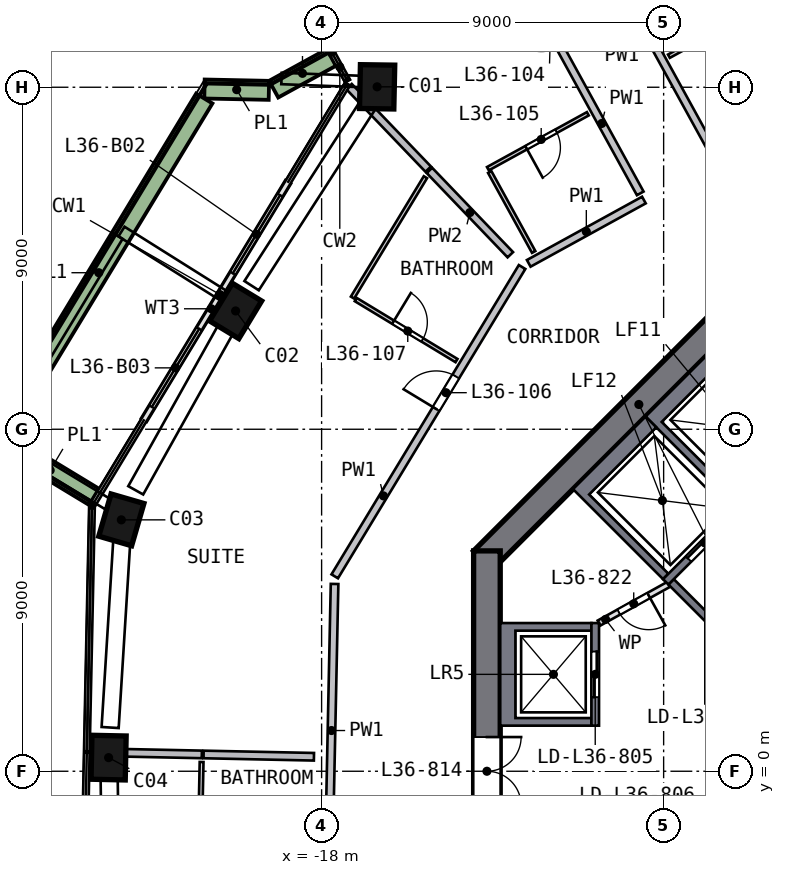
"""IFC4 building model, lengths in metres.
Left out: names, types, materials, properties, quantities, classifications, styles, units other than length and angle.
Written with IfcOpenShell. Run it as: python <this file> out.ifc"""

import sys

from ifc_helpers import new_model, si_unit, direction, frame, frame_2d, origin, origin_2d, place, context, subcontext, project, spatial, polyline, rectangle, outline, extrude, element, fill, save


model = new_model("IFC4")
c1 = context("Model", 3, precision=1e-05, world=origin(), true_north=direction((0.0, 1.0)))
c2 = subcontext(c1, "Body", "Model", "MODEL_VIEW")
j1 = project(units=[si_unit("LENGTHUNIT", "METRE"), si_unit("PLANEANGLEUNIT", "RADIAN")], contexts=[c1])
p1 = place(None, origin())
s1 = spatial("IfcSite", under=j1, at=p1, CompositionType="ELEMENT")
p2 = place(p1, origin())
s2 = spatial("IfcBuilding", under=s1, at=p2, CompositionType="ELEMENT")
p3 = place(p2, frame((0.0, 0.0, 150.5)))
s3 = spatial("IfcBuildingStorey", under=s2, at=p3, CompositionType="ELEMENT", Elevation=150.5)
p4 = place(p3, frame((-16.436, 18.106, 0.0), z_axis=(-0.085441544, -0.078828186, 0.993219945), x_axis=(0.014387845, 0.996663735, 0.080339219)))
e1 = element("IfcColumn", 1, at=p4, inside=s3, PredefinedType="COLUMN", context=c2, shape_type="SweptSolid", body=[
    extrude(rectangle(XDim=1.15, YDim=0.9, at=origin_2d()), origin(), (0.0, 0.0, 1.0), 3.212),
])
p5 = place(p3, frame((-20.194, 12.23, 0.0), z_axis=(-0.057418061, -0.096507973, 0.993674684), x_axis=(-0.515299129, -0.849621729, -0.112293037)))
e2 = element("IfcColumn", 2, at=p5, inside=s3, PredefinedType="COLUMN", context=c2, shape_type="SweptSolid", body=[
    extrude(rectangle(XDim=1.15, YDim=0.9, at=origin_2d()), origin(), (0.0, 0.0, 1.0), 3.21),
])
p6 = place(p3, frame((-23.232, 6.75, 0.0), z_axis=(-0.031170704, -0.11077004, 0.993357129), x_axis=(0.277188554, 0.953900326, 0.115068122)))
e3 = element("IfcColumn", 3, at=p6, inside=s3, PredefinedType="COLUMN", context=c2, shape_type="SweptSolid", body=[
    extrude(rectangle(XDim=1.15, YDim=0.9, at=origin_2d()), origin(), (0.0, 0.0, 1.0), 3.211),
])
p7 = place(p3, frame((-23.603, 0.494, 0.0), z_axis=(-0.001368902, -0.112325982, 0.993670468), x_axis=(-0.020539358, -0.993458621, -0.11233033)))
e4 = element("IfcColumn", 4, at=p7, inside=s3, PredefinedType="COLUMN", context=c2, shape_type="SweptSolid", body=[
    extrude(rectangle(XDim=1.15, YDim=0.9, at=origin_2d()), origin(), (0.0, 0.0, 1.0), 3.21),
])
p8 = place(p3, frame((-5.552, 13.752, 0.0), z_axis=(0.0, 0.0, 1.0), x_axis=(-0.707106781, -0.707106781, 0.0)))
e5 = element("IfcWall", 5, at=p8, inside=s3, PredefinedType="SHEAR", context=c2, shape_type="SweptSolid", body=[
    extrude(rectangle(XDim=11.598, YDim=0.7, at=frame_2d((5.799, 0.0))), origin(), (0.0, 0.0, 1.0), 3.5),
])
p9 = place(p3, frame((-13.65, 5.799, 0.0), z_axis=(0.0, 0.0, 1.0), x_axis=(0.0, -1.0, 0.0)))
e6 = element("IfcWall", 6, at=p9, inside=s3, PredefinedType="SHEAR", context=c2, shape_type="SweptSolid", body=[
    extrude(rectangle(XDim=11.598, YDim=0.7, at=frame_2d((5.799, 0.0))), origin(), (0.0, 0.0, 1.0), 3.5),
])
p10 = place(p9, frame((4.899, 0.0, 0.0)))
e7 = element("IfcOpeningElement", 7, at=p10, cuts=e6, PredefinedType="OPENING", context=c2, shape_type="SweptSolid", body=[
    extrude(rectangle(XDim=1.8, YDim=2.1, at=frame_2d((0.9, 1.05))), frame((0.0, 0.36, 0.0), z_axis=(0.0, -1.0, 0.0), x_axis=(1.0, 0.0, 0.0)), (0.0, 0.0, 1.0), 0.72),
])
p11 = place(p3, frame((-16.185, 19.84, 0.0), z_axis=(0.0, 0.0, 1.0), x_axis=(-0.876353337, -0.481668796, 0.0)))
e8 = element("IfcWall", 8, at=p11, inside=s3, PredefinedType="SOLIDWALL", context=c2, shape_type="SweptSolid", body=[
    extrude(rectangle(XDim=1.875, YDim=0.15, at=frame_2d((0.938, 0.0))), origin(), (0.0, 0.0, 1.0), 3.19),
])
p12 = place(p3, frame((-18.885, 15.5, 0.0), z_axis=(0.0, 0.0, 1.0), x_axis=(-0.518004284, -0.855378023, 0.0)))
e9 = element("IfcWall", 9, at=p12, inside=s3, PredefinedType="SOLIDWALL", context=c2, shape_type="SweptSolid", body=[
    extrude(rectangle(XDim=3.475, YDim=0.15, at=frame_2d((1.737, 0.0))), origin(), (0.0, 0.0, 1.0), 2.475),
])
p13 = place(p12, frame((0.4, 0.0, 0.0)))
e10 = element("IfcOpeningElement", 10, at=p13, cuts=e9, PredefinedType="OPENING", context=c2, shape_type="SweptSolid", body=[
    extrude(rectangle(XDim=2.4, YDim=2.4, at=frame_2d((1.2, 1.2))), frame((0.0, 0.085, 0.0), z_axis=(0.0, -1.0, 0.0), x_axis=(1.0, 0.0, 0.0)), (0.0, 0.0, 1.0), 0.17),
])
p14 = place(p3, frame((-20.686, 12.528, 0.0), z_axis=(0.0, 0.0, 1.0), x_axis=(-0.518011078, -0.855373908, 0.0)))
e11 = element("IfcWall", 11, at=p14, inside=s3, PredefinedType="SOLIDWALL", context=c2, shape_type="SweptSolid", body=[
    extrude(rectangle(XDim=3.835, YDim=0.15, at=frame_2d((1.918, 0.0))), origin(), (0.0, 0.0, 1.0), 2.475),
])
p15 = place(p14, frame((1.035, 0.0, 0.0)))
e12 = element("IfcOpeningElement", 12, at=p15, cuts=e11, PredefinedType="OPENING", context=c2, shape_type="SweptSolid", body=[
    extrude(rectangle(XDim=2.4, YDim=2.4, at=frame_2d((1.2, 1.2))), frame((0.0, 0.085, 0.0), z_axis=(0.0, -1.0, 0.0), x_axis=(1.0, 0.0, 0.0)), (0.0, 0.0, 1.0), 0.17),
])
p16 = place(p3, frame((-17.745, 18.783, 0.0), z_axis=(0.0, 0.0, 1.0), x_axis=(-0.876317123, -0.481734678, 0.0)))
e13 = element("IfcWall", 13, at=p16, inside=s3, PredefinedType="SOLIDWALL", context=c2, shape_type="SweptSolid", body=[
    extrude(rectangle(XDim=1.731, YDim=0.5, at=frame_2d((0.866, 0.0))), origin(), (0.0, 0.0, 1.0), 0.7),
])
p17 = place(p3, frame((-19.387, 17.918, 0.0), z_axis=(0.0, 0.0, 1.0), x_axis=(-0.99977885, 0.021029781, 0.0)))
e14 = element("IfcWall", 14, at=p17, inside=s3, PredefinedType="SOLIDWALL", context=c2, shape_type="SweptSolid", body=[
    extrude(rectangle(XDim=1.695, YDim=0.5, at=frame_2d((0.848, 0.0))), origin(), (0.0, 0.0, 1.0), 0.7),
])
p18 = place(p3, frame((-21.087, 17.704, 0.0), z_axis=(0.0, 0.0, 1.0), x_axis=(-0.518021549, -0.855367567, 0.0)))
e15 = element("IfcWall", 15, at=p18, inside=s3, PredefinedType="SOLIDWALL", context=c2, shape_type="SweptSolid", body=[
    extrude(rectangle(XDim=10.719, YDim=0.5, at=frame_2d((5.36, 0.0))), origin(), (0.0, 0.0, 1.0), 0.7),
])
p19 = place(p3, frame((-26.297, 8.619, 0.0), z_axis=(0.0, 0.0, 1.0), x_axis=(0.855354527, -0.518043081, 0.0)))
e16 = element("IfcWall", 16, at=p19, inside=s3, PredefinedType="SOLIDWALL", context=c2, shape_type="SweptSolid", body=[
    extrude(rectangle(XDim=2.699, YDim=0.5, at=frame_2d((1.35, 0.0))), origin(), (0.0, 0.0, 1.0), 0.7),
])
p20 = place(p3, origin())
e17 = element("IfcWall", 17, at=p20, inside=s3, PredefinedType="SOLIDWALL", context=c2, shape_type="SweptSolid", body=[
    extrude(outline(polyline([(-13.3, 3.9), (-10.9, 3.9), (-10.9, 3.7), (-12.9, 3.7), (-12.9, 1.4), (-10.9, 1.4), (-10.9, 1.2), (-13.3, 1.2), (-13.3, 3.9)])), origin(), (0.0, 0.0, 1.0), 3.19),
])
p21 = place(p3, frame((-10.8, 1.2, 0.0), z_axis=(0.0, 0.0, 1.0), x_axis=(0.0, 1.0, 0.0)))
e18 = element("IfcWall", 18, at=p21, inside=s3, PredefinedType="SOLIDWALL", context=c2, shape_type="SweptSolid", body=[
    extrude(rectangle(XDim=2.7, YDim=0.2, at=frame_2d((1.35, 0.0))), origin(), (0.0, 0.0, 1.0), 3.19),
])
p22 = place(p21, frame((0.75, 0.0, 0.0)))
e19 = element("IfcOpeningElement", 19, at=p22, cuts=e18, PredefinedType="OPENING", context=c2, shape_type="SweptSolid", body=[
    extrude(rectangle(XDim=1.2, YDim=2.1, at=frame_2d((0.6, 1.05))), frame((0.0, 0.11, 0.0), z_axis=(0.0, -1.0, 0.0), x_axis=(1.0, 0.0, 0.0)), (0.0, 0.0, 1.0), 0.22),
])
p23 = place(p3, origin())
e20 = element("IfcWall", 20, at=p23, inside=s3, PredefinedType="SOLIDWALL", context=c2, shape_type="SweptSolid", body=[
    extrude(outline(polyline([(-9.475, 9.334), (-7.425, 11.385), (-5.056, 9.016), (-5.197, 8.874), (-7.283, 10.96), (-9.051, 9.192), (-6.965, 7.106), (-7.106, 6.965), (-9.475, 9.334)])), origin(), (0.0, 0.0, 1.0), 3.19),
])
p24 = place(p3, origin())
e21 = element("IfcWall", 21, at=p24, inside=s3, PredefinedType="SOLIDWALL", context=c2, shape_type="SweptSolid", body=[
    extrude(outline(polyline([(-11.385, 7.425), (-9.475, 9.334), (-9.192, 9.051), (-10.96, 7.283), (-8.874, 5.197), (-9.016, 5.056), (-11.385, 7.425)])), origin(), (0.0, 0.0, 1.0), 3.19),
])
p25 = place(p3, frame((-7.036, 6.894, 0.0), z_axis=(0.0, 0.0, 1.0), x_axis=(-0.707106781, -0.707106781, 0.0)))
e22 = element("IfcWall", 22, at=p25, inside=s3, PredefinedType="SOLIDWALL", context=c2, shape_type="SweptSolid", body=[
    extrude(rectangle(XDim=2.7, YDim=0.2, at=frame_2d((1.35, 0.0))), origin(), (0.0, 0.0, 1.0), 3.19),
])
p26 = place(p25, frame((0.65, 0.0, 0.0)))
e23 = element("IfcOpeningElement", 23, at=p26, cuts=e22, PredefinedType="OPENING", context=c2, shape_type="SweptSolid", body=[
    extrude(rectangle(XDim=1.2, YDim=2.1, at=frame_2d((0.6, 1.05))), frame((0.0, 0.11, 0.0), z_axis=(0.0, -1.0, 0.0), x_axis=(1.0, 0.0, 0.0)), (0.0, 0.0, 1.0), 0.22),
])
p27 = place(p3, frame((-6.823, 3.005, 0.0), z_axis=(0.0, 0.0, 1.0), x_axis=(-0.707106781, 0.707106781, 0.0)))
e24 = element("IfcWall", 24, at=p27, inside=s3, PredefinedType="SOLIDWALL", context=c2, shape_type="SweptSolid", body=[
    extrude(rectangle(XDim=2.8, YDim=0.2, at=frame_2d((1.4, 0.0))), origin(), (0.0, 0.0, 1.0), 3.19),
])
p28 = place(p3, frame((-8.874, 4.914, 0.0), z_axis=(0.0, 0.0, 1.0), x_axis=(-0.874129705, -0.485692555, 0.0)))
e25 = element("IfcWall", 25, at=p28, inside=s3, PredefinedType="PARTITIONING", context=c2, shape_type="SweptSolid", body=[
    extrude(rectangle(XDim=2.089, YDim=0.15, at=frame_2d((1.044, 0.0))), origin(), (0.0, 0.0, 1.0), 3.19),
])
p29 = place(p28, frame((0.594, 0.0, 0.0)))
e26 = element("IfcOpeningElement", 26, at=p29, cuts=e25, PredefinedType="OPENING", context=c2, shape_type="SweptSolid", body=[
    extrude(rectangle(XDim=0.9, YDim=2.1, at=frame_2d((0.45, 1.05))), frame((0.0, 0.085, 0.0), z_axis=(0.0, -1.0, 0.0), x_axis=(1.0, 0.0, 0.0)), (0.0, 0.0, 1.0), 0.17),
])
p30 = place(p3, frame((-17.85, -4.185, 0.0), z_axis=(0.0, 0.0, 1.0), x_axis=(0.020944265, 0.999780645, 0.0)))
e27 = element("IfcWall", 27, at=p30, inside=s3, PredefinedType="SOLIDWALL", context=c2, shape_type="SweptSolid", body=[
    extrude(rectangle(XDim=9.115, YDim=0.2, at=frame_2d((4.558, 0.0))), origin(), (0.0, 0.0, 1.0), 3.19),
])
p31 = place(p30, frame((0.2, 0.0, 0.0)))
e28 = element("IfcOpeningElement", 28, at=p31, cuts=e27, PredefinedType="OPENING", context=c2, shape_type="SweptSolid", body=[
    extrude(rectangle(XDim=1.0, YDim=2.1, at=frame_2d((0.5, 1.05))), frame((0.0, 0.11, 0.0), z_axis=(0.0, -1.0, 0.0), x_axis=(1.0, 0.0, 0.0)), (0.0, 0.0, 1.0), 0.22),
])
p32 = place(p3, frame((-17.655, 5.13, 0.0), z_axis=(0.0, 0.0, 1.0), x_axis=(0.518037864, 0.855357686, 0.0)))
e29 = element("IfcWall", 29, at=p32, inside=s3, PredefinedType="SOLIDWALL", context=c2, shape_type="SweptSolid", body=[
    extrude(rectangle(XDim=9.516, YDim=0.2, at=frame_2d((4.758, 0.0))), origin(), (0.0, 0.0, 1.0), 3.19),
])
p33 = place(p32, frame((5.15, 0.0, 0.0)))
e30 = element("IfcOpeningElement", 30, at=p33, cuts=e29, PredefinedType="OPENING", context=c2, shape_type="SweptSolid", body=[
    extrude(rectangle(XDim=1.0, YDim=2.1, at=frame_2d((0.5, 1.05))), frame((0.0, 0.11, 0.0), z_axis=(0.0, -1.0, 0.0), x_axis=(1.0, 0.0, 0.0)), (0.0, 0.0, 1.0), 0.22),
])
p34 = place(p3, frame((-9.615, 15.207, 0.0), z_axis=(0.0, 0.0, 1.0), x_axis=(-0.481736431, 0.876316159, 0.0)))
e31 = element("IfcWall", 31, at=p34, inside=s3, PredefinedType="SOLIDWALL", context=c2, shape_type="SweptSolid", body=[
    extrude(rectangle(XDim=7.3, YDim=0.2, at=frame_2d((3.65, 0.0))), origin(), (0.0, 0.0, 1.0), 3.19),
])
p35 = place(p34, frame((4.4, 0.0, 0.0)))
e32 = element("IfcOpeningElement", 32, at=p35, cuts=e31, PredefinedType="OPENING", context=c2, shape_type="SweptSolid", body=[
    extrude(rectangle(XDim=1.0, YDim=2.1, at=frame_2d((0.5, 1.05))), frame((0.0, 0.11, 0.0), z_axis=(0.0, -1.0, 0.0), x_axis=(1.0, 0.0, 0.0)), (0.0, 0.0, 1.0), 0.22),
])
p36 = place(p3, frame((-9.519, 15.032, 0.0), z_axis=(0.0, 0.0, 1.0), x_axis=(-0.876309794, -0.481748009, 0.0)))
e33 = element("IfcWall", 33, at=p36, inside=s3, PredefinedType="SOLIDWALL", context=c2, shape_type="SweptSolid", body=[
    extrude(rectangle(XDim=3.458, YDim=0.2, at=frame_2d((1.729, 0.0))), origin(), (0.0, 0.0, 1.0), 3.19),
])
p37 = place(p3, frame((-7.688, 16.267, 0.0), z_axis=(0.0, 0.0, 1.0), x_axis=(-0.481747995, 0.876309802, 0.0)))
e34 = element("IfcWall", 34, at=p37, inside=s3, PredefinedType="SOLIDWALL", context=c2, shape_type="SweptSolid", body=[
    extrude(rectangle(XDim=7.3, YDim=0.2, at=frame_2d((3.65, 0.0))), origin(), (0.0, 0.0, 1.0), 3.19),
])
p38 = place(p3, frame((-21.152, 0.443, 0.0), z_axis=(0.0, 0.0, 1.0), x_axis=(-0.999781079, 0.020923535, 0.0)))
e35 = element("IfcWall", 35, at=p38, inside=s3, PredefinedType="SOLIDWALL", context=c2, shape_type="SweptSolid", body=[
    extrude(rectangle(XDim=2.952, YDim=0.2, at=frame_2d((1.476, 0.0))), origin(), (0.0, 0.0, 1.0), 3.19),
])
p39 = place(p3, frame((-18.202, 0.381, 0.0), z_axis=(0.0, 0.0, 1.0), x_axis=(-0.999780973, 0.02092858, 0.0)))
e36 = element("IfcWall", 36, at=p39, inside=s3, PredefinedType="SOLIDWALL", context=c2, shape_type="SweptSolid", body=[
    extrude(rectangle(XDim=2.905, YDim=0.2, at=frame_2d((1.452, 0.0))), origin(), (0.0, 0.0, 1.0), 3.19),
])
p40 = place(p3, frame((-15.194, 15.844, 0.0), z_axis=(0.0, 0.0, 1.0), x_axis=(-0.692157108, 0.721746865, 0.0)))
e37 = element("IfcWall", 37, at=p40, inside=s3, PredefinedType="SOLIDWALL", context=c2, shape_type="SweptSolid", body=[
    extrude(rectangle(XDim=3.011, YDim=0.2, at=frame_2d((1.506, 0.0))), origin(), (0.0, 0.0, 1.0), 3.19),
])
p41 = place(p3, frame((-13.034, 13.592, 0.0), z_axis=(0.0, 0.0, 1.0), x_axis=(-0.692182982, 0.721722051, 0.0)))
e38 = element("IfcWall", 38, at=p41, inside=s3, PredefinedType="SOLIDWALL", context=c2, shape_type="SweptSolid", body=[
    extrude(rectangle(XDim=3.074, YDim=0.2, at=frame_2d((1.537, 0.0))), origin(), (0.0, 0.0, 1.0), 3.19),
])
p42 = place(p3, frame((-21.214, -2.456, 0.0), z_axis=(0.0, 0.0, 1.0), x_axis=(0.020887185, 0.999781839, 0.0)))
e39 = element("IfcWall", 39, at=p42, inside=s3, PredefinedType="PARTITIONING", context=c2, shape_type="SweptSolid", body=[
    extrude(rectangle(XDim=2.7, YDim=0.1, at=frame_2d((1.35, 0.0))), origin(), (0.0, 0.0, 1.0), 3.19),
])
p43 = place(p3, frame((-17.187, 12.465, 0.0), z_axis=(0.0, 0.0, 1.0), x_axis=(0.518019749, 0.855368657, 0.0)))
e40 = element("IfcWall", 40, at=p43, inside=s3, PredefinedType="PARTITIONING", context=c2, shape_type="SweptSolid", body=[
    extrude(rectangle(XDim=3.704, YDim=0.1, at=frame_2d((1.852, 0.0))), origin(), (0.0, 0.0, 1.0), 3.19),
])
p44 = place(p3, frame((-17.102, 12.413, 0.0), z_axis=(0.0, 0.0, 1.0), x_axis=(0.855352235, -0.518046865, 0.0)))
e41 = element("IfcWall", 41, at=p44, inside=s3, PredefinedType="PARTITIONING", context=c2, shape_type="SweptSolid", body=[
    extrude(rectangle(XDim=3.1, YDim=0.1, at=frame_2d((1.55, 0.0))), origin(), (0.0, 0.0, 1.0), 3.19),
])
p45 = place(p44, frame((1.15, 0.0, 0.0)))
e42 = element("IfcOpeningElement", 42, at=p45, cuts=e41, PredefinedType="OPENING", context=c2, shape_type="SweptSolid", body=[
    extrude(rectangle(XDim=0.9, YDim=2.1, at=frame_2d((0.45, 1.05))), frame((0.0, 0.06, 0.0), z_axis=(0.0, -1.0, 0.0), x_axis=(1.0, 0.0, 0.0)), (0.0, 0.0, 1.0), 0.12),
])
p46 = place(p3, frame((-12.42, 13.666, 0.0), z_axis=(0.0, 0.0, 1.0), x_axis=(-0.481707849, 0.876331871, 0.0)))
e43 = element("IfcWall", 43, at=p46, inside=s3, PredefinedType="PARTITIONING", context=c2, shape_type="SweptSolid", body=[
    extrude(rectangle(XDim=2.4, YDim=0.1, at=frame_2d((1.2, 0.0))), origin(), (0.0, 0.0, 1.0), 3.19),
])
p47 = place(p3, frame((-10.995, 17.302, 0.0), z_axis=(0.0, 0.0, 1.0), x_axis=(-0.876298369, -0.481768791, 0.0)))
e44 = element("IfcWall", 44, at=p47, inside=s3, PredefinedType="PARTITIONING", context=c2, shape_type="SweptSolid", body=[
    extrude(rectangle(XDim=3.0, YDim=0.1, at=frame_2d((1.5, 0.0))), origin(), (0.0, 0.0, 1.0), 3.19),
])
p48 = place(p47, frame((0.95, 0.0, 0.0)))
e45 = element("IfcOpeningElement", 45, at=p48, cuts=e44, PredefinedType="OPENING", context=c2, shape_type="SweptSolid", body=[
    extrude(rectangle(XDim=0.9, YDim=2.1, at=frame_2d((0.45, 1.05))), frame((0.0, 0.06, 0.0), z_axis=(0.0, -1.0, 0.0), x_axis=(1.0, 0.0, 0.0)), (0.0, 0.0, 1.0), 0.12),
])
p49 = place(p3, frame((-6.058, 20.358, 0.0), z_axis=(0.0, 0.0, 1.0), x_axis=(-0.876301289, -0.48176348, 0.0)))
e46 = element("IfcWall", 46, at=p49, inside=s3, PredefinedType="PARTITIONING", context=c2, shape_type="SweptSolid", body=[
    extrude(rectangle(XDim=3.199, YDim=0.1, at=frame_2d((1.6, 0.0))), origin(), (0.0, 0.0, 1.0), 3.19),
])
p50 = place(p49, frame((1.25, 0.0, 0.0)))
e47 = element("IfcOpeningElement", 47, at=p50, cuts=e46, PredefinedType="OPENING", context=c2, shape_type="SweptSolid", body=[
    extrude(rectangle(XDim=0.9, YDim=2.1, at=frame_2d((0.45, 1.05))), frame((0.0, 0.06, 0.0), z_axis=(0.0, -1.0, 0.0), x_axis=(1.0, 0.0, 0.0)), (0.0, 0.0, 1.0), 0.12),
])
p51 = place(p13, origin())
e48 = element("IfcDoor", 48, at=p51, inside=s3, OperationType="SLIDING_TO_RIGHT", PredefinedType="DOOR", context=c2, shape_type="SweptSolid", body=[
    extrude(rectangle(XDim=2.4, YDim=2.4, at=frame_2d((1.2, 1.2))), frame((0.0, 0.025, 0.0), z_axis=(0.0, -1.0, 0.0), x_axis=(1.0, 0.0, 0.0)), (0.0, 0.0, 1.0), 0.05),
])
fill(e10, e48)
p52 = place(p15, origin())
e49 = element("IfcDoor", 49, at=p52, inside=s3, OperationType="SLIDING_TO_LEFT", PredefinedType="DOOR", context=c2, shape_type="SweptSolid", body=[
    extrude(rectangle(XDim=2.4, YDim=2.4, at=frame_2d((1.2, 1.2))), frame((0.0, 0.025, 0.0), z_axis=(0.0, -1.0, 0.0), x_axis=(1.0, 0.0, 0.0)), (0.0, 0.0, 1.0), 0.05),
])
fill(e12, e49)
p53 = place(p22, origin())
e50 = element("IfcDoor", 50, at=p53, inside=s3, OperationType="DOUBLE_DOOR_SLIDING", PredefinedType="DOOR", context=c2, shape_type="SweptSolid", body=[
    extrude(rectangle(XDim=1.2, YDim=2.1, at=frame_2d((0.6, 1.05))), frame((0.0, 0.025, 0.0), z_axis=(0.0, -1.0, 0.0), x_axis=(1.0, 0.0, 0.0)), (0.0, 0.0, 1.0), 0.05),
])
fill(e19, e50)
p54 = place(p26, origin())
e51 = element("IfcDoor", 51, at=p54, inside=s3, OperationType="DOUBLE_DOOR_SLIDING", PredefinedType="DOOR", context=c2, shape_type="SweptSolid", body=[
    extrude(rectangle(XDim=1.2, YDim=2.1, at=frame_2d((0.6, 1.05))), frame((0.0, 0.025, 0.0), z_axis=(0.0, -1.0, 0.0), x_axis=(1.0, 0.0, 0.0)), (0.0, 0.0, 1.0), 0.05),
])
fill(e23, e51)
p55 = place(p10, origin())
e52 = element("IfcDoor", 52, at=p55, inside=s3, OperationType="DOUBLE_DOOR_SINGLE_SWING", PredefinedType="DOOR", context=c2, shape_type="SweptSolid", body=[
    extrude(rectangle(XDim=1.8, YDim=2.1, at=frame_2d((0.9, 1.05))), frame((0.0, 0.025, 0.0), z_axis=(0.0, -1.0, 0.0), x_axis=(1.0, 0.0, 0.0)), (0.0, 0.0, 1.0), 0.05),
])
fill(e7, e52)
p56 = place(p29, origin())
e53 = element("IfcDoor", 53, at=p56, inside=s3, OperationType="SINGLE_SWING_LEFT", PredefinedType="DOOR", context=c2, shape_type="SweptSolid", body=[
    extrude(rectangle(XDim=0.9, YDim=2.1, at=frame_2d((0.45, 1.05))), frame((0.0, 0.025, 0.0), z_axis=(0.0, -1.0, 0.0), x_axis=(1.0, 0.0, 0.0)), (0.0, 0.0, 1.0), 0.05),
])
fill(e26, e53)
p57 = place(p48, origin())
e54 = element("IfcDoor", 54, at=p57, inside=s3, OperationType="SINGLE_SWING_RIGHT", PredefinedType="DOOR", context=c2, shape_type="SweptSolid", body=[
    extrude(rectangle(XDim=0.9, YDim=2.1, at=frame_2d((0.45, 1.05))), frame((0.0, 0.025, 0.0), z_axis=(0.0, -1.0, 0.0), x_axis=(1.0, 0.0, 0.0)), (0.0, 0.0, 1.0), 0.05),
])
fill(e45, e54)
p58 = place(p33, origin())
e55 = element("IfcDoor", 55, at=p58, inside=s3, OperationType="SINGLE_SWING_LEFT", PredefinedType="DOOR", context=c2, shape_type="SweptSolid", body=[
    extrude(rectangle(XDim=1.0, YDim=2.1, at=frame_2d((0.5, 1.05))), frame((0.0, 0.025, 0.0), z_axis=(0.0, -1.0, 0.0), x_axis=(1.0, 0.0, 0.0)), (0.0, 0.0, 1.0), 0.05),
])
fill(e30, e55)
p59 = place(p45, origin())
e56 = element("IfcDoor", 56, at=p59, inside=s3, OperationType="SINGLE_SWING_LEFT", PredefinedType="DOOR", context=c2, shape_type="SweptSolid", body=[
    extrude(rectangle(XDim=0.9, YDim=2.1, at=frame_2d((0.45, 1.05))), frame((0.0, 0.025, 0.0), z_axis=(0.0, -1.0, 0.0), x_axis=(1.0, 0.0, 0.0)), (0.0, 0.0, 1.0), 0.05),
])
fill(e42, e56)
save(model, sys.argv[1])
